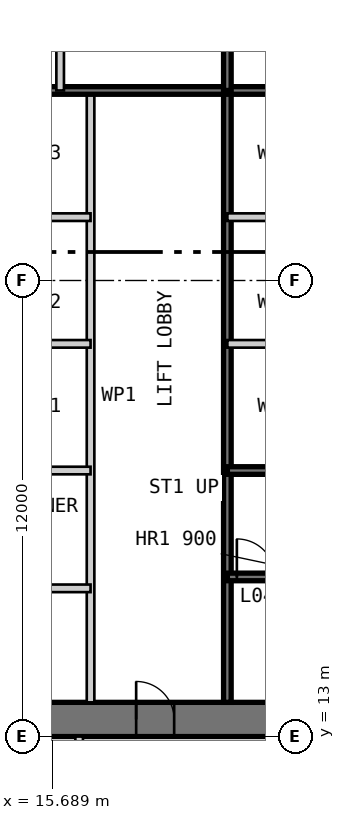
"""IFC4 building model, lengths in metres.
Left out: names, types, materials, properties, quantities, classifications, styles, units other than length and angle.
Written with IfcOpenShell. Run it as: python <this file> out.ifc"""

import sys

from ifc_helpers import new_model, si_unit, direction, frame, frame_2d, origin, place, context, subcontext, project, spatial, polyline, rectangle, outline, extrude, element, fill, save


model = new_model("IFC4")
c1 = context("Model", 3, precision=1e-05, world=origin(), true_north=direction((0.0, 1.0)))
c2 = subcontext(c1, "Body", "Model", "MODEL_VIEW")
j1 = project(units=[si_unit("LENGTHUNIT", "METRE"), si_unit("PLANEANGLEUNIT", "RADIAN")], contexts=[c1])
p1 = place(None, origin())
s1 = spatial("IfcSite", under=j1, at=p1, CompositionType="ELEMENT")
p2 = place(p1, origin())
s2 = spatial("IfcBuilding", under=s1, at=p2, CompositionType="ELEMENT")
p3 = place(p2, frame((0.0, 0.0, 21.4)))
s3 = spatial("IfcBuildingStorey", under=s2, at=p3, CompositionType="ELEMENT", Elevation=21.4)
p4 = place(p3, frame((13.0, 13.45, 0.0), z_axis=(0.0, 0.0, 1.0), x_axis=(1.0, 0.0, 0.0)))
e1 = element("IfcWall", 1, at=p4, inside=s3, PredefinedType="SHEAR", context=c2, shape_type="SweptSolid", body=[
    extrude(outline(polyline([(0.0, -0.45), (24.0, -0.45), (23.1, 0.45), (0.9, 0.45), (0.0, -0.45)])), origin(), (0.0, 0.0, 1.0), 4.8),
])
p5 = place(p4, frame((4.9, 0.0, 0.0)))
e2 = element("IfcOpeningElement", 2, at=p5, cuts=e1, PredefinedType="OPENING", context=c2, shape_type="SweptSolid", body=[
    extrude(rectangle(XDim=1.0, YDim=2.2, at=frame_2d((0.5, 1.1))), frame((0.0, 0.46, 0.0), z_axis=(0.0, -1.0, 0.0), x_axis=(1.0, 0.0, 0.0)), (0.0, 0.0, 1.0), 0.92),
])
p6 = place(p4, frame((8.9, 0.0, 0.0)))
e3 = element("IfcOpeningElement", 3, at=p6, cuts=e1, PredefinedType="OPENING", context=c2, shape_type="SweptSolid", body=[
    extrude(rectangle(XDim=1.1, YDim=2.2, at=frame_2d((0.55, 1.1))), frame((0.0, 0.46, 0.0), z_axis=(0.0, -1.0, 0.0), x_axis=(1.0, 0.0, 0.0)), (0.0, 0.0, 1.0), 0.92),
])
p7 = place(p4, frame((15.05, 0.0, 0.0)))
e4 = element("IfcOpeningElement", 4, at=p7, cuts=e1, PredefinedType="OPENING", context=c2, shape_type="SweptSolid", body=[
    extrude(rectangle(XDim=0.9, YDim=2.2, at=frame_2d((0.45, 1.1))), frame((0.0, 0.46, 0.0), z_axis=(0.0, -1.0, 0.0), x_axis=(1.0, 0.0, 0.0)), (0.0, 0.0, 1.0), 0.92),
])
p8 = place(p4, frame((17.9, 0.0, 0.0)))
e5 = element("IfcOpeningElement", 5, at=p8, cuts=e1, PredefinedType="OPENING", context=c2, shape_type="SweptSolid", body=[
    extrude(rectangle(XDim=1.0, YDim=2.2, at=frame_2d((0.5, 1.1))), frame((0.0, 0.46, 0.0), z_axis=(0.0, -1.0, 0.0), x_axis=(1.0, 0.0, 0.0)), (0.0, 0.0, 1.0), 0.92),
])
p9 = place(p4, frame((21.4, 0.0, 0.0)))
e6 = element("IfcOpeningElement", 6, at=p9, cuts=e1, PredefinedType="OPENING", context=c2, shape_type="SweptSolid", body=[
    extrude(rectangle(XDim=1.0, YDim=2.2, at=frame_2d((0.5, 1.1))), frame((0.0, 0.46, 0.0), z_axis=(0.0, -1.0, 0.0), x_axis=(1.0, 0.0, 0.0)), (0.0, 0.0, 1.0), 0.92),
])
p10 = place(p3, frame((16.7, 13.9, 0.0), z_axis=(0.0, 0.0, 1.0), x_axis=(0.0, 1.0, 0.0)))
e7 = element("IfcWall", 7, at=p10, inside=s3, PredefinedType="PARTITIONING", context=c2, shape_type="SweptSolid", body=[
    extrude(rectangle(XDim=16.1, YDim=0.2, at=frame_2d((8.05, 0.0))), origin(), (0.0, 0.0, 1.0), 4.6),
])
p11 = place(p3, frame((20.3, 13.9, 0.0), z_axis=(0.0, 0.0, 1.0), x_axis=(0.0, 1.0, 0.0)))
e8 = element("IfcWall", 8, at=p11, inside=s3, PredefinedType="SOLIDWALL", context=c2, shape_type="SweptSolid", body=[
    extrude(rectangle(XDim=16.1, YDim=0.2, at=frame_2d((8.05, 0.0))), origin(), (0.0, 0.0, 1.0), 4.6),
])
for number, where, z_axis, x_axis in (
    (9, (13.9, 20.0, 0.0), (0.0, 0.0, 1.0), (1.0, 0.0, 0.0)),
    (10, (13.9, 23.333, 0.0), (0.0, 0.0, 1.0), (1.0, 0.0, 0.0)),
    (11, (13.9, 26.667, 0.0), (0.0, 0.0, 1.0), (1.0, 0.0, 0.0)),
    (12, (20.3, 23.333, 0.0), (0.0, 0.0, 1.0), (1.0, 0.0, 0.0)),
    (13, (20.3, 26.667, 0.0), (0.0, 0.0, 1.0), (1.0, 0.0, 0.0)),
):
    element("IfcWall", number, at=place(p3, frame(where, z_axis=z_axis, x_axis=x_axis)), inside=s3, PredefinedType="PARTITIONING", context=c2, shape_type="SweptSolid", body=[
        extrude(rectangle(XDim=2.8, YDim=0.2, at=frame_2d((1.4, 0.0))), origin(), (0.0, 0.0, 1.0), 4.6),
    ])
p12 = place(p3, frame((20.3, 17.2, 0.0), z_axis=(0.0, 0.0, 1.0), x_axis=(1.0, 0.0, 0.0)))
e14 = element("IfcWall", 14, at=p12, inside=s3, PredefinedType="SOLIDWALL", context=c2, shape_type="SweptSolid", body=[
    extrude(rectangle(XDim=9.4, YDim=0.2, at=frame_2d((4.7, 0.0))), origin(), (0.0, 0.0, 1.0), 4.6),
])
p13 = place(p12, frame((0.25, 0.0, 0.0)))
e15 = element("IfcOpeningElement", 15, at=p13, cuts=e14, PredefinedType="OPENING", context=c2, shape_type="SweptSolid", body=[
    extrude(rectangle(XDim=1.0, YDim=2.2, at=frame_2d((0.5, 1.1))), frame((0.0, 0.11, 0.0), z_axis=(0.0, -1.0, 0.0), x_axis=(1.0, 0.0, 0.0)), (0.0, 0.0, 1.0), 0.22),
])
p14 = place(p3, frame((20.3, 20.0, 0.0), z_axis=(0.0, 0.0, 1.0), x_axis=(1.0, 0.0, 0.0)))
e16 = element("IfcWall", 16, at=p14, inside=s3, PredefinedType="SOLIDWALL", context=c2, shape_type="SweptSolid", body=[
    extrude(rectangle(XDim=15.8, YDim=0.2, at=frame_2d((7.9, 0.0))), origin(), (0.0, 0.0, 1.0), 4.6),
])
p15 = place(p3, frame((13.9, 16.9, 0.0), z_axis=(0.0, 0.0, 1.0), x_axis=(1.0, 0.0, 0.0)))
e17 = element("IfcWall", 17, at=p15, inside=s3, PredefinedType="PARTITIONING", context=c2, shape_type="SweptSolid", body=[
    extrude(rectangle(XDim=2.8, YDim=0.2, at=frame_2d((1.4, 0.0))), origin(), (0.0, 0.0, 1.0), 4.6),
])
p16 = place(p3, frame((29.7, 30.0, 0.0), z_axis=(0.0, 0.0, 1.0), x_axis=(-1.0, 0.0, 0.0)))
e18 = element("IfcWall", 18, at=p16, inside=s3, PredefinedType="SOLIDWALL", context=c2, shape_type="SweptSolid", body=[
    extrude(rectangle(XDim=15.8, YDim=0.2, at=frame_2d((7.9, 0.0))), origin(), (0.0, 0.0, 1.0), 4.6),
])
p17 = place(p3, frame((20.3, 36.1, 0.0), z_axis=(0.0, 0.0, 1.0), x_axis=(0.0, -1.0, 0.0)))
e19 = element("IfcWall", 19, at=p17, inside=s3, PredefinedType="SOLIDWALL", context=c2, shape_type="SweptSolid", body=[
    extrude(rectangle(XDim=6.1, YDim=0.2, at=frame_2d((3.05, 0.0))), origin(), (0.0, 0.0, 1.0), 4.6),
])
p18 = place(p3, frame((15.9, 36.1, 0.0), z_axis=(0.0, 0.0, 1.0), x_axis=(0.0, -1.0, 0.0)))
e20 = element("IfcWall", 20, at=p18, inside=s3, PredefinedType="PARTITIONING", context=c2, shape_type="SweptSolid", body=[
    extrude(rectangle(XDim=6.1, YDim=0.2, at=frame_2d((3.05, 0.0))), origin(), (0.0, 0.0, 1.0), 4.6),
])
p19 = place(p3, frame((16.4, 7.0, 0.0), z_axis=(0.0, 0.0, 1.0), x_axis=(0.0, 1.0, 0.0)))
e21 = element("IfcWall", 21, at=p19, inside=s3, PredefinedType="PARTITIONING", context=c2, shape_type="SweptSolid", body=[
    extrude(rectangle(XDim=6.0, YDim=0.2, at=frame_2d((3.0, 0.0))), origin(), (0.0, 0.0, 1.0), 4.5),
])
p20 = place(p5, origin())
e22 = element("IfcDoor", 22, at=p20, inside=s3, OperationType="SINGLE_SWING_LEFT", PredefinedType="DOOR", context=c2, shape_type="SweptSolid", body=[
    extrude(rectangle(XDim=1.0, YDim=2.2, at=frame_2d((0.5, 1.1))), frame((0.0, 0.025, 0.0), z_axis=(0.0, -1.0, 0.0), x_axis=(1.0, 0.0, 0.0)), (0.0, 0.0, 1.0), 0.05),
    extrude(outline(polyline([(0.0, 0.0), (0.04, 0.0), (0.04, 2.16), (0.96, 2.16), (0.96, 0.0), (1.0, 0.0), (1.0, 2.2), (0.0, 2.2), (0.0, 0.0)])), frame((0.0, 0.3, 0.0), z_axis=(0.0, -1.0, 0.0), x_axis=(1.0, 0.0, 0.0)), (0.0, 0.0, 1.0), 0.6),
])
fill(e2, e22)
p21 = place(p13, origin())
e23 = element("IfcDoor", 23, at=p21, inside=s3, OperationType="SINGLE_SWING_LEFT", PredefinedType="DOOR", context=c2, shape_type="SweptSolid", body=[
    extrude(rectangle(XDim=1.0, YDim=2.2, at=frame_2d((0.5, 1.1))), frame((0.0, 0.025, 0.0), z_axis=(0.0, -1.0, 0.0), x_axis=(1.0, 0.0, 0.0)), (0.0, 0.0, 1.0), 0.05),
])
fill(e15, e23)
save(model, sys.argv[1])
